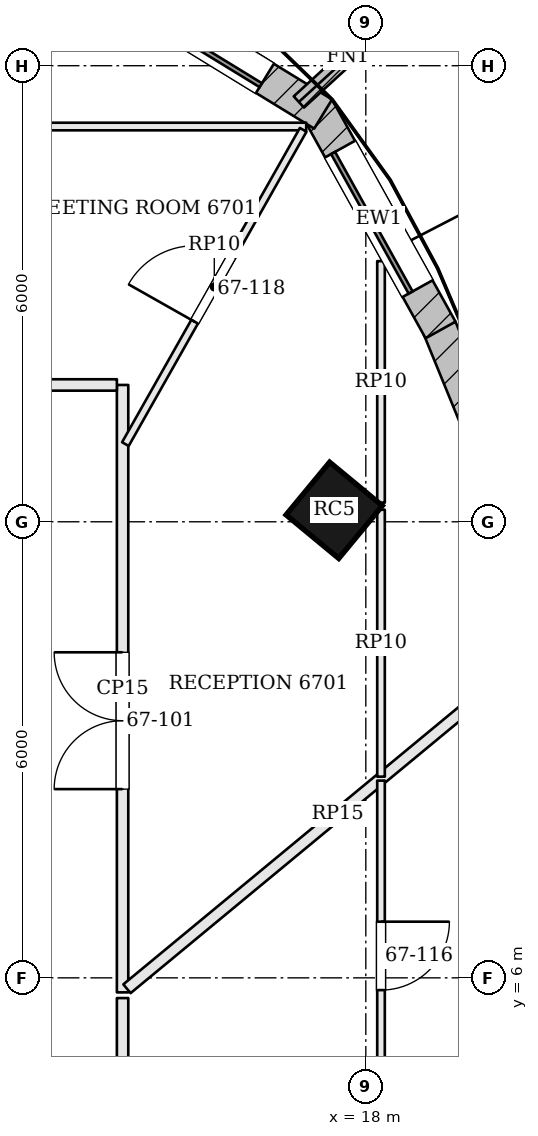
"""IFC4 building model, lengths in metres.
Left out: names, types, materials, properties, quantities, classifications, styles, units other than length and angle.
Written with IfcOpenShell. Run it as: python <this file> out.ifc"""

import sys

from ifc_helpers import new_model, si_unit, direction, frame, frame_2d, origin, origin_2d, place, context, subcontext, project, spatial, rectangle, extrude, element, fill, save


model = new_model("IFC4")
c1 = context("Model", 3, precision=1e-05, world=origin(), true_north=direction((0.0, 1.0)))
c2 = subcontext(c1, "Body", "Model", "MODEL_VIEW")
j1 = project(units=[si_unit("LENGTHUNIT", "METRE"), si_unit("PLANEANGLEUNIT", "RADIAN")], contexts=[c1])
p1 = place(None, origin())
s1 = spatial("IfcSite", under=j1, at=p1, CompositionType="ELEMENT")
p2 = place(p1, origin())
s2 = spatial("IfcBuilding", under=s1, at=p2, CompositionType="ELEMENT")
p3 = place(p2, frame((0.0, 0.0, 272.7)))
s3 = spatial("IfcBuildingStorey", under=s2, at=p3, CompositionType="ELEMENT", Elevation=272.7)
p4 = place(p3, frame((17.584, 12.151, 0.0), z_axis=(0.0, 0.0, 1.0), x_axis=(-0.770679191336, 0.637223339216, 0.0)))
e1 = element("IfcColumn", 1, at=p4, inside=s3, PredefinedType="COLUMN", context=c2, shape_type="SweptSolid", body=[
    extrude(rectangle(XDim=0.9, YDim=0.9, at=origin_2d()), origin(), (0.0, 0.0, 1.0), 3.9),
])
p5 = place(p3, frame((20.753, 10.191, 0.0), z_axis=(0.0, 0.0, 1.0), x_axis=(-0.378471272902, 0.925613037715, 0.0)))
e2 = element("IfcWall", 2, at=p5, inside=s3, PredefinedType="SOLIDWALL", context=c2, shape_type="SweptSolid", body=[
    extrude(rectangle(XDim=4.707, YDim=0.45, at=frame_2d((2.354, 0.0))), origin(), (0.0, 0.0, 1.0), 3.7),
])
p6 = place(p5, frame((1.303, 0.0, 0.9)))
e3 = element("IfcOpeningElement", 3, at=p6, cuts=e2, PredefinedType="OPENING", context=c2, shape_type="SweptSolid", body=[
    extrude(rectangle(XDim=2.1, YDim=2.3, at=frame_2d((1.05, 1.15))), frame((0.0, 0.235, 0.0), z_axis=(0.0, -1.0, 0.0), x_axis=(1.0, 0.0, 0.0)), (0.0, 0.0, 1.0), 0.47),
])
p7 = place(p3, frame((18.983, 14.523, 0.0), z_axis=(0.0, 0.0, 1.0), x_axis=(-0.485630534022, 0.874164163316, 0.0)))
e4 = element("IfcWall", 4, at=p7, inside=s3, PredefinedType="SOLIDWALL", context=c2, shape_type="SweptSolid", body=[
    extrude(rectangle(XDim=3.344, YDim=0.45, at=frame_2d((1.672, 0.0))), origin(), (0.0, 0.0, 1.0), 3.7),
])
p8 = place(p7, frame((0.622, 0.0, 0.9)))
e5 = element("IfcOpeningElement", 5, at=p8, cuts=e4, PredefinedType="OPENING", context=c2, shape_type="SweptSolid", body=[
    extrude(rectangle(XDim=2.1, YDim=2.3, at=frame_2d((1.05, 1.15))), frame((0.0, 0.235, 0.0), z_axis=(0.0, -1.0, 0.0), x_axis=(1.0, 0.0, 0.0)), (0.0, 0.0, 1.0), 0.47),
])
p9 = place(p3, frame((17.438, 17.364, 0.0), z_axis=(0.0, 0.0, 1.0), x_axis=(-0.852622865325, 0.522526793117, 0.0)))
e6 = element("IfcWall", 6, at=p9, inside=s3, PredefinedType="SOLIDWALL", context=c2, shape_type="SweptSolid", body=[
    extrude(rectangle(XDim=3.896, YDim=0.45, at=frame_2d((1.948, 0.0))), origin(), (0.0, 0.0, 1.0), 3.7),
])
p10 = place(p9, frame((0.898, 0.0, 0.9)))
e7 = element("IfcOpeningElement", 7, at=p10, cuts=e6, PredefinedType="OPENING", context=c2, shape_type="SweptSolid", body=[
    extrude(rectangle(XDim=2.1, YDim=2.3, at=frame_2d((1.05, 1.15))), frame((0.0, 0.235, 0.0), z_axis=(0.0, -1.0, 0.0), x_axis=(1.0, 0.0, 0.0)), (0.0, 0.0, 1.0), 0.47),
])
p11 = place(p3, frame((17.119, 17.523, 0.0), z_axis=(0.0, 0.0, 1.0), x_axis=(0.737866019047, 0.674947211221, 0.0)))
e8 = element("IfcWall", 8, at=p11, inside=s3, PredefinedType="SOLIDWALL", context=c2, shape_type="SweptSolid", body=[
    extrude(rectangle(XDim=1.75, YDim=0.2, at=frame_2d((0.875, 0.0))), origin(), (0.0, 0.0, 1.0), 3.7),
])
p12 = place(p3, frame((16.617, 17.955, 3.9), z_axis=(0.0, 0.0, 1.0), x_axis=(-0.852620335105, 0.522530921732, 0.0)))
e9 = element("IfcWall", 9, at=p12, inside=s3, PredefinedType="PARAPET", context=c2, shape_type="SweptSolid", body=[
    extrude(rectangle(XDim=2.758, YDim=0.3, at=frame_2d((1.379, 0.0))), origin(), (0.0, 0.0, 1.0), 1.1),
])
p13 = place(p3, frame((14.8, 5.809, 0.0), z_axis=(0.0, 0.0, 1.0), x_axis=(0.0, 1.0, 0.0)))
e10 = element("IfcWall", 10, at=p13, inside=s3, PredefinedType="PARTITIONING", context=c2, shape_type="SweptSolid", body=[
    extrude(rectangle(XDim=7.991, YDim=0.15, at=frame_2d((3.996, 0.0))), origin(), (0.0, 0.0, 1.0), 3.198),
])
p14 = place(p13, frame((2.674, 0.0, 0.0)))
e11 = element("IfcOpeningElement", 11, at=p14, cuts=e10, PredefinedType="OPENING", context=c2, shape_type="SweptSolid", body=[
    extrude(rectangle(XDim=1.8, YDim=2.1, at=frame_2d((0.9, 1.05))), frame((0.0, 0.085, 0.0), z_axis=(0.0, -1.0, 0.0), x_axis=(1.0, 0.0, 0.0)), (0.0, 0.0, 1.0), 0.17),
])
p15 = place(p3, frame((14.725, 13.8, 0.0), z_axis=(0.0, 0.0, 1.0), x_axis=(-1.0, 0.0, 0.0)))
e12 = element("IfcWall", 12, at=p15, inside=s3, PredefinedType="PARTITIONING", context=c2, shape_type="SweptSolid", body=[
    extrude(rectangle(XDim=23.281, YDim=0.15, at=frame_2d((11.64, 0.0))), origin(), (0.0, 0.0, 1.0), 3.198),
])
p16 = place(p15, frame((3.15, 0.0, 0.0)))
e13 = element("IfcOpeningElement", 13, at=p16, cuts=e12, PredefinedType="OPENING", context=c2, shape_type="SweptSolid", body=[
    extrude(rectangle(XDim=1.0, YDim=2.4, at=frame_2d((0.5, 1.2))), frame((0.0, 0.085, 0.0), z_axis=(0.0, -1.0, 0.0), x_axis=(1.0, 0.0, 0.0)), (0.0, 0.0, 1.0), 0.17),
])
p17 = place(p15, frame((5.425, 0.0, 0.0)))
e14 = element("IfcOpeningElement", 14, at=p17, cuts=e12, PredefinedType="OPENING", context=c2, shape_type="SweptSolid", body=[
    extrude(rectangle(XDim=1.0, YDim=2.4, at=frame_2d((0.5, 1.2))), frame((0.0, 0.085, 0.0), z_axis=(0.0, -1.0, 0.0), x_axis=(1.0, 0.0, 0.0)), (0.0, 0.0, 1.0), 0.17),
])
p18 = place(p15, frame((11.558, 0.0, 0.0)))
e15 = element("IfcOpeningElement", 15, at=p18, cuts=e12, PredefinedType="OPENING", context=c2, shape_type="SweptSolid", body=[
    extrude(rectangle(XDim=1.0, YDim=2.4, at=frame_2d((0.5, 1.2))), frame((0.0, 0.085, 0.0), z_axis=(0.0, -1.0, 0.0), x_axis=(1.0, 0.0, 0.0)), (0.0, 0.0, 1.0), 0.17),
])
p19 = place(p15, frame((15.95, 0.0, 0.0)))
e16 = element("IfcOpeningElement", 16, at=p19, cuts=e12, PredefinedType="OPENING", context=c2, shape_type="SweptSolid", body=[
    extrude(rectangle(XDim=0.9, YDim=2.1, at=frame_2d((0.45, 1.05))), frame((0.0, 0.085, 0.0), z_axis=(0.0, -1.0, 0.0), x_axis=(1.0, 0.0, 0.0)), (0.0, 0.0, 1.0), 0.17),
])
p20 = place(p15, frame((19.95, 0.0, 0.0)))
e17 = element("IfcOpeningElement", 17, at=p20, cuts=e12, PredefinedType="OPENING", context=c2, shape_type="SweptSolid", body=[
    extrude(rectangle(XDim=1.0, YDim=2.1, at=frame_2d((0.5, 1.05))), frame((0.0, 0.085, 0.0), z_axis=(0.0, -1.0, 0.0), x_axis=(1.0, 0.0, 0.0)), (0.0, 0.0, 1.0), 0.17),
])
p21 = place(p3, frame((20.403, 10.442, 0.0), z_axis=(0.0, 0.0, 1.0), x_axis=(-0.770613226955, -0.637303110334, 0.0)))
e18 = element("IfcWall", 18, at=p21, inside=s3, PredefinedType="PARTITIONING", context=c2, shape_type="SweptSolid", body=[
    extrude(rectangle(XDim=7.196, YDim=0.15, at=frame_2d((3.598, 0.0))), origin(), (0.0, 0.0, 1.0), 3.198),
])
p22 = place(p3, frame((14.8, -4.725, 0.0), z_axis=(0.0, 0.0, 1.0), x_axis=(0.0, 1.0, 0.0)))
e19 = element("IfcWall", 19, at=p22, inside=s3, PredefinedType="PARTITIONING", context=c2, shape_type="SweptSolid", body=[
    extrude(rectangle(XDim=10.459, YDim=0.15, at=frame_2d((5.229, 0.0))), origin(), (0.0, 0.0, 1.0), 3.198),
])
p23 = place(p22, frame((0.45, 0.0, 0.0)))
e20 = element("IfcOpeningElement", 20, at=p23, cuts=e19, PredefinedType="OPENING", context=c2, shape_type="SweptSolid", body=[
    extrude(rectangle(XDim=1.0, YDim=2.4, at=frame_2d((0.5, 1.2))), frame((0.0, 0.085, 0.0), z_axis=(0.0, -1.0, 0.0), x_axis=(1.0, 0.0, 0.0)), (0.0, 0.0, 1.0), 0.17),
])
p24 = place(p3, frame((2.879, 17.2, 0.0), z_axis=(0.0, 0.0, 1.0), x_axis=(1.0, 0.0, 0.0)))
e21 = element("IfcWall", 21, at=p24, inside=s3, PredefinedType="PARTITIONING", context=c2, shape_type="SweptSolid", body=[
    extrude(rectangle(XDim=14.337, YDim=0.1, at=frame_2d((7.168, 0.0))), origin(), (0.0, 0.0, 1.0), 3.184),
])
p25 = place(p24, frame((6.65, 0.0, 0.0)))
e22 = element("IfcOpeningElement", 22, at=p25, cuts=e21, PredefinedType="OPENING", context=c2, shape_type="SweptSolid", body=[
    extrude(rectangle(XDim=1.0, YDim=2.4, at=frame_2d((0.5, 1.2))), frame((0.0, 0.06, 0.0), z_axis=(0.0, -1.0, 0.0), x_axis=(1.0, 0.0, 0.0)), (0.0, 0.0, 1.0), 0.12),
])
p26 = place(p3, frame((18.2, 15.429, 0.0), z_axis=(0.0, 0.0, 1.0), x_axis=(0.0, -1.0, 0.0)))
e23 = element("IfcWall", 23, at=p26, inside=s3, PredefinedType="PARTITIONING", context=c2, shape_type="SweptSolid", body=[
    extrude(rectangle(XDim=3.177, YDim=0.1, at=frame_2d((1.589, 0.0))), origin(), (0.0, 0.0, 1.0), 3.184),
])
p27 = place(p3, frame((18.2, 12.158, 0.0), z_axis=(0.0, 0.0, 1.0), x_axis=(0.0, -1.0, 0.0)))
e24 = element("IfcWall", 24, at=p27, inside=s3, PredefinedType="PARTITIONING", context=c2, shape_type="SweptSolid", body=[
    extrude(rectangle(XDim=3.512, YDim=0.1, at=frame_2d((1.756, 0.0))), origin(), (0.0, 0.0, 1.0), 3.184),
])
p28 = place(p3, frame((14.837, 13.022, 0.0), z_axis=(0.0, 0.0, 1.0), x_axis=(0.492409466631, 0.870363669492, 0.0)))
e25 = element("IfcWall", 25, at=p28, inside=s3, PredefinedType="PARTITIONING", context=c2, shape_type="SweptSolid", body=[
    extrude(rectangle(XDim=4.75, YDim=0.1, at=frame_2d((2.375, 0.0))), origin(), (0.0, 0.0, 1.0), 3.184),
])
p29 = place(p28, frame((1.85, 0.0, 0.0)))
e26 = element("IfcOpeningElement", 26, at=p29, cuts=e25, PredefinedType="OPENING", context=c2, shape_type="SweptSolid", body=[
    extrude(rectangle(XDim=1.0, YDim=2.4, at=frame_2d((0.5, 1.2))), frame((0.0, 0.06, 0.0), z_axis=(0.0, -1.0, 0.0), x_axis=(1.0, 0.0, 0.0)), (0.0, 0.0, 1.0), 0.12),
])
p30 = place(p3, frame((18.2, 8.595, 0.0), z_axis=(0.0, 0.0, 1.0), x_axis=(0.0, -1.0, 0.0)))
e27 = element("IfcWall", 27, at=p30, inside=s3, PredefinedType="PARTITIONING", context=c2, shape_type="SweptSolid", body=[
    extrude(rectangle(XDim=16.795, YDim=0.1, at=frame_2d((8.397, 0.0))), origin(), (0.0, 0.0, 1.0), 3.184),
])
p31 = place(p30, frame((7.332, 0.0, 0.0)))
e28 = element("IfcOpeningElement", 28, at=p31, cuts=e27, PredefinedType="OPENING", context=c2, shape_type="SweptSolid", body=[
    extrude(rectangle(XDim=0.9, YDim=2.1, at=frame_2d((0.45, 1.05))), frame((0.0, 0.06, 0.0), z_axis=(0.0, -1.0, 0.0), x_axis=(1.0, 0.0, 0.0)), (0.0, 0.0, 1.0), 0.12),
])
p32 = place(p30, frame((1.856, 0.0, 0.0)))
e29 = element("IfcOpeningElement", 29, at=p32, cuts=e27, PredefinedType="OPENING", context=c2, shape_type="SweptSolid", body=[
    extrude(rectangle(XDim=0.9, YDim=2.1, at=frame_2d((0.45, 1.05))), frame((0.0, 0.06, 0.0), z_axis=(0.0, -1.0, 0.0), x_axis=(1.0, 0.0, 0.0)), (0.0, 0.0, 1.0), 0.12),
])
p33 = place(p8, origin())
e30 = element("IfcWindow", 30, at=p33, inside=s3, PartitioningType="SINGLE_PANEL", PredefinedType="WINDOW", context=c2, shape_type="SweptSolid", body=[
    extrude(rectangle(XDim=2.1, YDim=2.3, at=frame_2d((1.05, 1.15))), frame((0.0, 0.135, 0.0), z_axis=(0.0, -1.0, 0.0), x_axis=(1.0, 0.0, 0.0)), (0.0, 0.0, 1.0), 0.06),
])
fill(e5, e30)
p34 = place(p10, origin())
e31 = element("IfcWindow", 31, at=p34, inside=s3, PartitioningType="SINGLE_PANEL", PredefinedType="WINDOW", context=c2, shape_type="SweptSolid", body=[
    extrude(rectangle(XDim=2.1, YDim=2.3, at=frame_2d((1.05, 1.15))), frame((0.0, 0.135, 0.0), z_axis=(0.0, -1.0, 0.0), x_axis=(1.0, 0.0, 0.0)), (0.0, 0.0, 1.0), 0.06),
])
fill(e7, e31)
p35 = place(p14, origin())
e32 = element("IfcDoor", 32, at=p35, inside=s3, OperationType="DOUBLE_DOOR_SINGLE_SWING", PredefinedType="DOOR", context=c2, shape_type="SweptSolid", body=[
    extrude(rectangle(XDim=1.8, YDim=2.1, at=frame_2d((0.9, 1.05))), frame((0.0, 0.025, 0.0), z_axis=(0.0, -1.0, 0.0), x_axis=(1.0, 0.0, 0.0)), (0.0, 0.0, 1.0), 0.05),
])
fill(e11, e32)
p36 = place(p32, origin())
e33 = element("IfcDoor", 33, at=p36, inside=s3, OperationType="SINGLE_SWING_LEFT", PredefinedType="DOOR", context=c2, shape_type="SweptSolid", body=[
    extrude(rectangle(XDim=0.9, YDim=2.1, at=frame_2d((0.45, 1.05))), frame((0.0, 0.025, 0.0), z_axis=(0.0, -1.0, 0.0), x_axis=(1.0, 0.0, 0.0)), (0.0, 0.0, 1.0), 0.05),
])
fill(e29, e33)
p37 = place(p29, origin())
e34 = element("IfcDoor", 34, at=p37, inside=s3, OperationType="SINGLE_SWING_LEFT", PredefinedType="DOOR", context=c2, shape_type="SweptSolid", body=[
    extrude(rectangle(XDim=1.0, YDim=2.4, at=frame_2d((0.5, 1.2))), frame((0.0, 0.025, 0.0), z_axis=(0.0, -1.0, 0.0), x_axis=(1.0, 0.0, 0.0)), (0.0, 0.0, 1.0), 0.05),
])
fill(e26, e34)
save(model, sys.argv[1])
